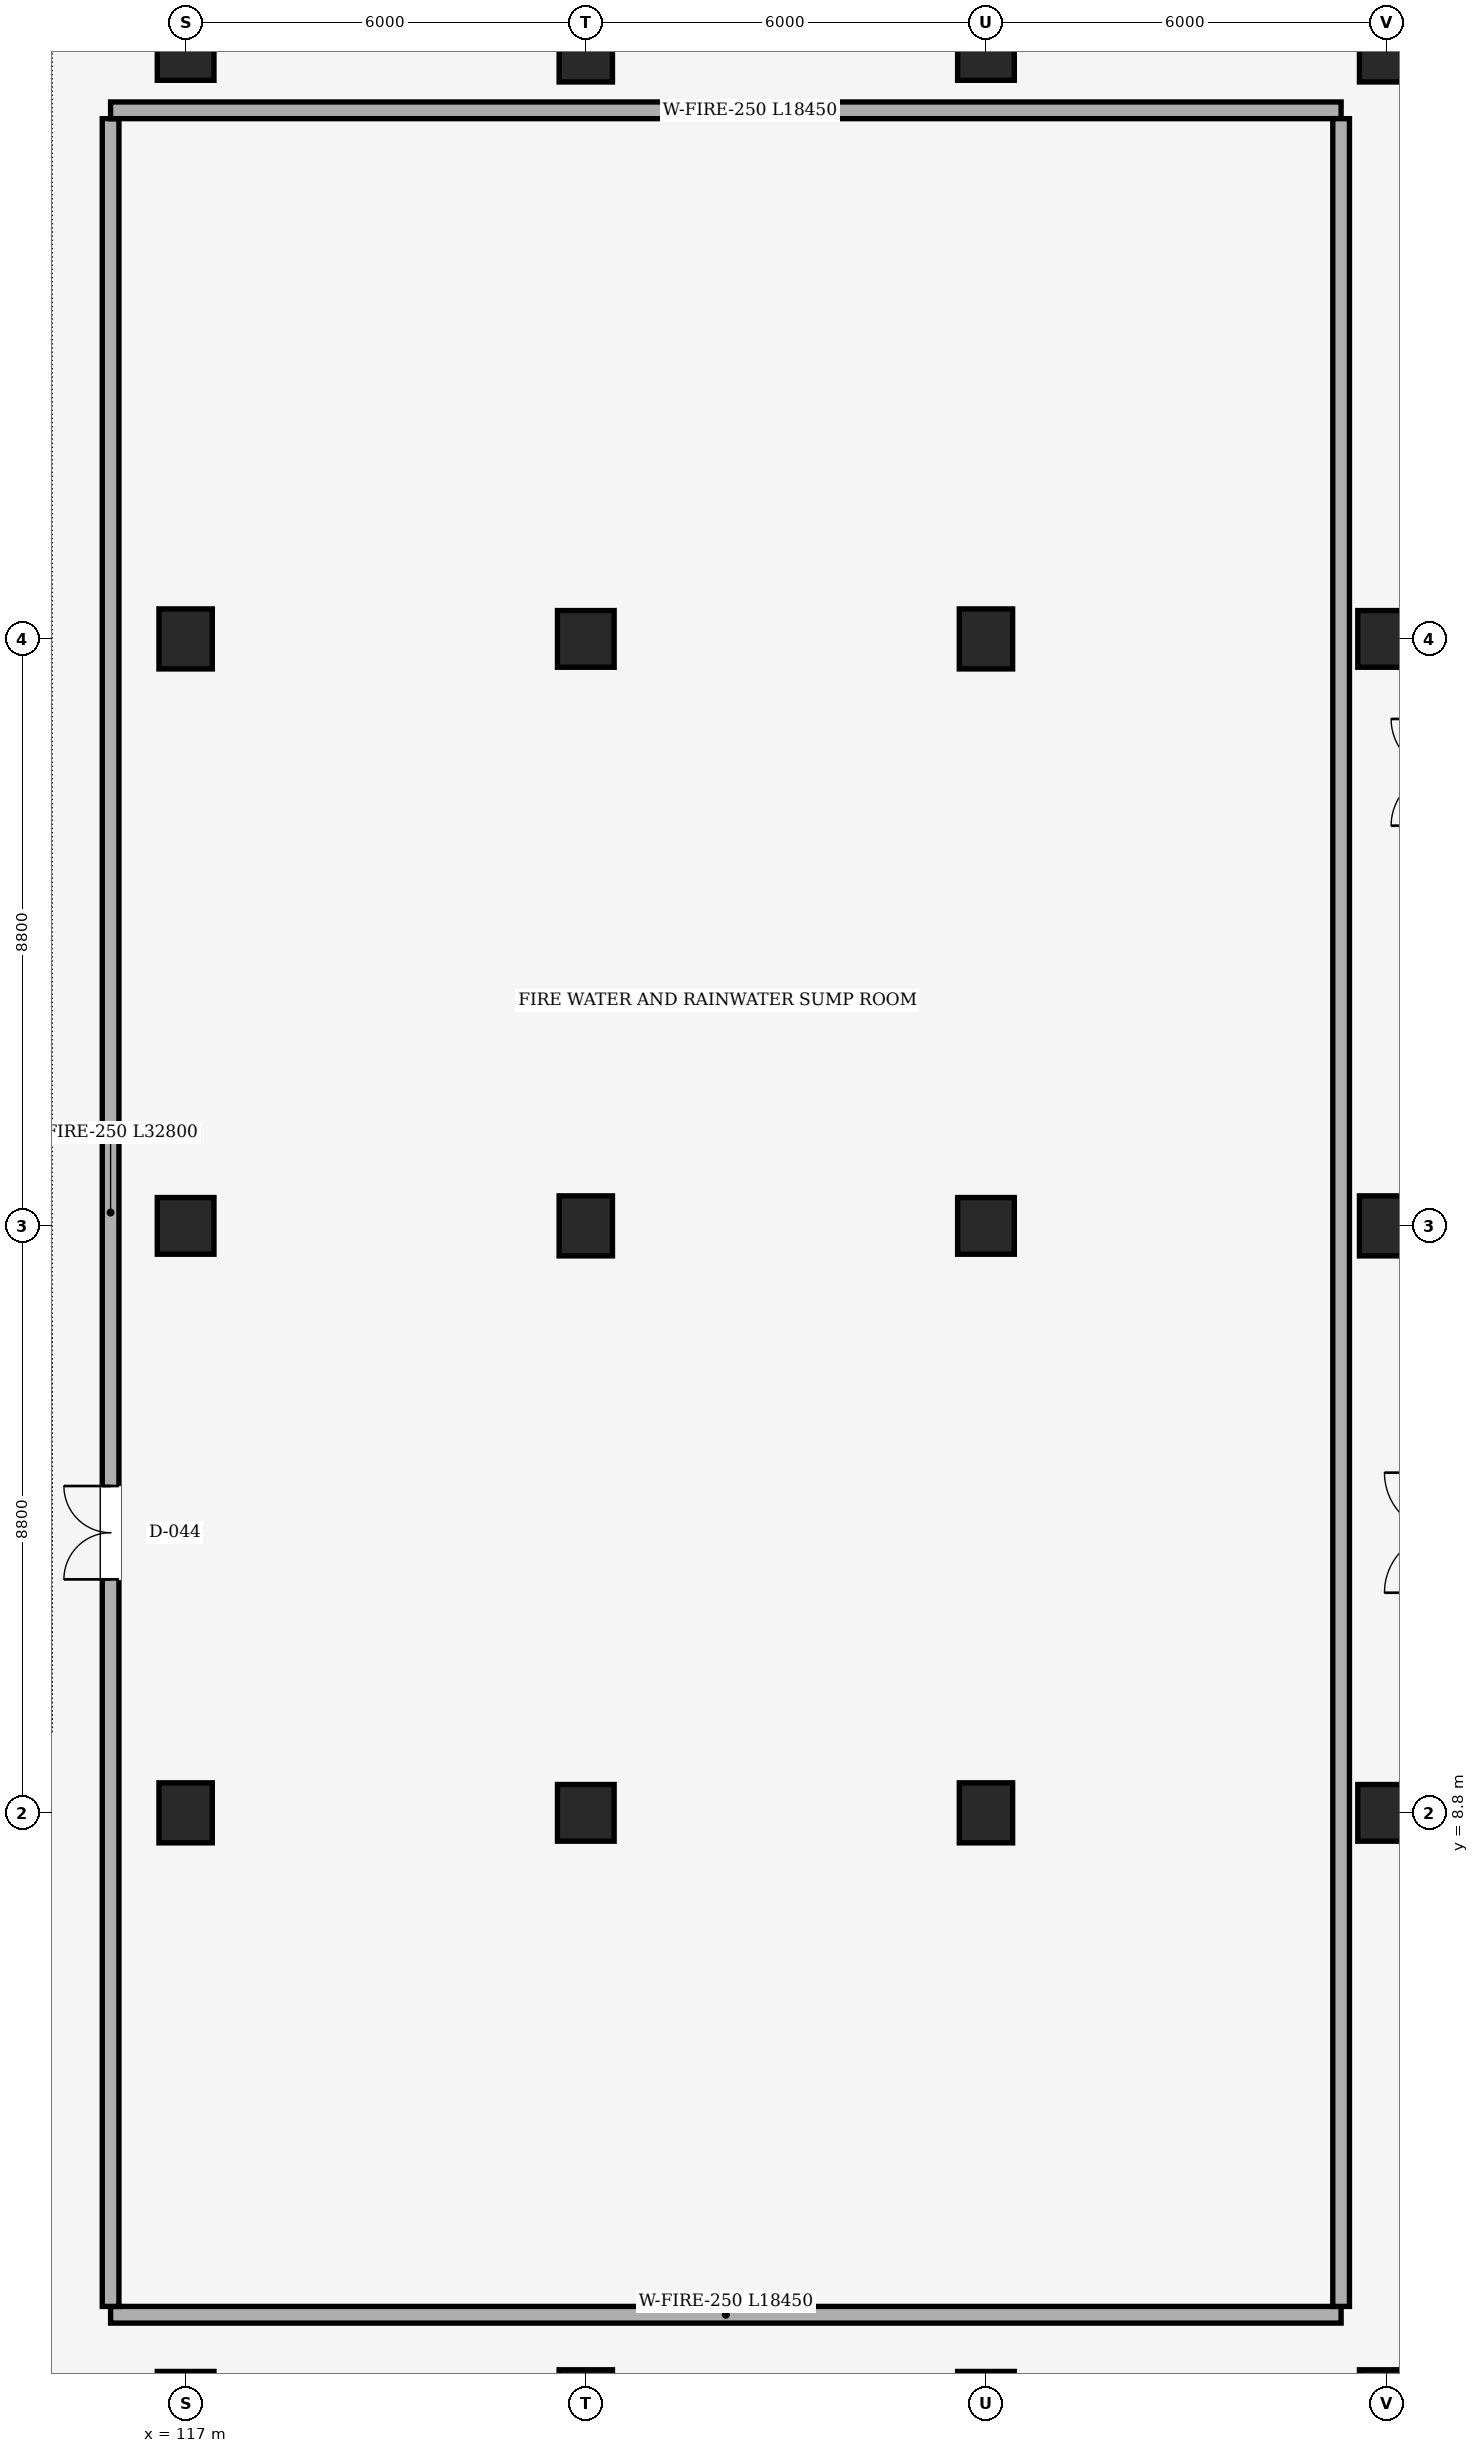
"""IFC4 building model, lengths in metres.
Left out: names, types, materials, properties, quantities, classifications, styles, units other than length and angle.
Written with IfcOpenShell. Run it as: python <this file> out.ifc"""

import sys

from ifc_helpers import new_model, si_unit, direction, frame, frame_2d, origin, origin_2d, place, context, subcontext, project, spatial, rectangle, extrude, element, fill, save


model = new_model("IFC4")
c1 = context("Model", 3, precision=1e-05, world=origin(), true_north=direction((0.0, 1.0)))
c2 = subcontext(c1, "Body", "Model", "MODEL_VIEW")
j1 = project(units=[si_unit("LENGTHUNIT", "METRE"), si_unit("PLANEANGLEUNIT", "RADIAN")], contexts=[c1])
p1 = place(None, origin())
s1 = spatial("IfcSite", under=j1, at=p1, CompositionType="ELEMENT")
p2 = place(p1, origin())
s2 = spatial("IfcBuilding", under=s1, at=p2, CompositionType="ELEMENT")
p3 = place(p2, frame((0.0, 0.0, -4.2)))
s3 = spatial("IfcBuildingStorey", under=s2, at=p3, CompositionType="ELEMENT", Elevation=-4.2)
p4 = place(p3, frame((117.0, 0.0, 0.0), z_axis=(0.0, 0.0, 1.0), x_axis=(1.0, 0.0, 0.0)))
e1 = element("IfcColumn", 1, at=p4, inside=s3, PredefinedType="COLUMN", context=c2, shape_type="SweptSolid", body=[
    extrude(rectangle(XDim=0.85, YDim=0.85, at=origin_2d()), origin(), (0.0, 0.0, 1.0), 3.92),
])
p5 = place(p3, frame((117.0, 8.8, 0.0), z_axis=(0.0, 0.0, 1.0), x_axis=(1.0, 0.0, 0.0)))
e2 = element("IfcColumn", 2, at=p5, inside=s3, PredefinedType="COLUMN", context=c2, shape_type="SweptSolid", body=[
    extrude(rectangle(XDim=0.8, YDim=0.9, at=origin_2d()), origin(), (0.0, 0.0, 1.0), 3.92),
])
p6 = place(p3, frame((117.0, 17.6, 0.0), z_axis=(0.0, 0.0, 1.0), x_axis=(1.0, 0.0, 0.0)))
e3 = element("IfcColumn", 3, at=p6, inside=s3, PredefinedType="COLUMN", context=c2, shape_type="SweptSolid", body=[
    extrude(rectangle(XDim=0.85, YDim=0.85, at=origin_2d()), origin(), (0.0, 0.0, 1.0), 3.92),
])
p7 = place(p3, frame((117.0, 26.4, 0.0), z_axis=(0.0, 0.0, 1.0), x_axis=(1.0, 0.0, 0.0)))
e4 = element("IfcColumn", 4, at=p7, inside=s3, PredefinedType="COLUMN", context=c2, shape_type="SweptSolid", body=[
    extrude(rectangle(XDim=0.8, YDim=0.9, at=origin_2d()), origin(), (0.0, 0.0, 1.0), 3.92),
])
p8 = place(p3, frame((117.0, 35.2, 0.0), z_axis=(0.0, 0.0, 1.0), x_axis=(1.0, 0.0, 0.0)))
e5 = element("IfcColumn", 5, at=p8, inside=s3, PredefinedType="COLUMN", context=c2, shape_type="SweptSolid", body=[
    extrude(rectangle(XDim=0.85, YDim=0.85, at=origin_2d()), origin(), (0.0, 0.0, 1.0), 3.92),
])
p9 = place(p3, frame((123.0, 0.0, 0.0), z_axis=(0.0, 0.0, 1.0), x_axis=(1.0, 0.0, 0.0)))
e6 = element("IfcColumn", 6, at=p9, inside=s3, PredefinedType="COLUMN", context=c2, shape_type="SweptSolid", body=[
    extrude(rectangle(XDim=0.8, YDim=0.9, at=origin_2d()), origin(), (0.0, 0.0, 1.0), 3.92),
])
p10 = place(p3, frame((123.0, 8.8, 0.0), z_axis=(0.0, 0.0, 1.0), x_axis=(1.0, 0.0, 0.0)))
e7 = element("IfcColumn", 7, at=p10, inside=s3, PredefinedType="COLUMN", context=c2, shape_type="SweptSolid", body=[
    extrude(rectangle(XDim=0.85, YDim=0.85, at=origin_2d()), origin(), (0.0, 0.0, 1.0), 3.92),
])
p11 = place(p3, frame((123.0, 17.6, 0.0), z_axis=(0.0, 0.0, 1.0), x_axis=(1.0, 0.0, 0.0)))
e8 = element("IfcColumn", 8, at=p11, inside=s3, PredefinedType="COLUMN", context=c2, shape_type="SweptSolid", body=[
    extrude(rectangle(XDim=0.8, YDim=0.9, at=origin_2d()), origin(), (0.0, 0.0, 1.0), 3.92),
])
p12 = place(p3, frame((123.0, 26.4, 0.0), z_axis=(0.0, 0.0, 1.0), x_axis=(1.0, 0.0, 0.0)))
e9 = element("IfcColumn", 9, at=p12, inside=s3, PredefinedType="COLUMN", context=c2, shape_type="SweptSolid", body=[
    extrude(rectangle(XDim=0.85, YDim=0.85, at=origin_2d()), origin(), (0.0, 0.0, 1.0), 3.92),
])
p13 = place(p3, frame((123.0, 35.2, 0.0), z_axis=(0.0, 0.0, 1.0), x_axis=(1.0, 0.0, 0.0)))
e10 = element("IfcColumn", 10, at=p13, inside=s3, PredefinedType="COLUMN", context=c2, shape_type="SweptSolid", body=[
    extrude(rectangle(XDim=0.8, YDim=0.9, at=origin_2d()), origin(), (0.0, 0.0, 1.0), 3.92),
])
p14 = place(p3, frame((129.0, 0.0, 0.0), z_axis=(0.0, 0.0, 1.0), x_axis=(1.0, 0.0, 0.0)))
e11 = element("IfcColumn", 11, at=p14, inside=s3, PredefinedType="COLUMN", context=c2, shape_type="SweptSolid", body=[
    extrude(rectangle(XDim=0.85, YDim=0.85, at=origin_2d()), origin(), (0.0, 0.0, 1.0), 3.92),
])
p15 = place(p3, frame((129.0, 8.8, 0.0), z_axis=(0.0, 0.0, 1.0), x_axis=(1.0, 0.0, 0.0)))
e12 = element("IfcColumn", 12, at=p15, inside=s3, PredefinedType="COLUMN", context=c2, shape_type="SweptSolid", body=[
    extrude(rectangle(XDim=0.8, YDim=0.9, at=origin_2d()), origin(), (0.0, 0.0, 1.0), 3.92),
])
p16 = place(p3, frame((129.0, 17.6, 0.0), z_axis=(0.0, 0.0, 1.0), x_axis=(1.0, 0.0, 0.0)))
e13 = element("IfcColumn", 13, at=p16, inside=s3, PredefinedType="COLUMN", context=c2, shape_type="SweptSolid", body=[
    extrude(rectangle(XDim=0.85, YDim=0.85, at=origin_2d()), origin(), (0.0, 0.0, 1.0), 3.92),
])
p17 = place(p3, frame((129.0, 26.4, 0.0), z_axis=(0.0, 0.0, 1.0), x_axis=(1.0, 0.0, 0.0)))
e14 = element("IfcColumn", 14, at=p17, inside=s3, PredefinedType="COLUMN", context=c2, shape_type="SweptSolid", body=[
    extrude(rectangle(XDim=0.8, YDim=0.9, at=origin_2d()), origin(), (0.0, 0.0, 1.0), 3.92),
])
p18 = place(p3, frame((129.0, 35.2, 0.0), z_axis=(0.0, 0.0, 1.0), x_axis=(1.0, 0.0, 0.0)))
e15 = element("IfcColumn", 15, at=p18, inside=s3, PredefinedType="COLUMN", context=c2, shape_type="SweptSolid", body=[
    extrude(rectangle(XDim=0.85, YDim=0.85, at=origin_2d()), origin(), (0.0, 0.0, 1.0), 3.92),
])
p19 = place(p3, frame((135.0, 0.0, 0.0), z_axis=(0.0, 0.0, 1.0), x_axis=(1.0, 0.0, 0.0)))
e16 = element("IfcColumn", 16, at=p19, inside=s3, PredefinedType="COLUMN", context=c2, shape_type="SweptSolid", body=[
    extrude(rectangle(XDim=0.8, YDim=0.9, at=origin_2d()), origin(), (0.0, 0.0, 1.0), 3.92),
])
p20 = place(p3, frame((135.0, 8.8, 0.0), z_axis=(0.0, 0.0, 1.0), x_axis=(1.0, 0.0, 0.0)))
e17 = element("IfcColumn", 17, at=p20, inside=s3, PredefinedType="COLUMN", context=c2, shape_type="SweptSolid", body=[
    extrude(rectangle(XDim=0.85, YDim=0.85, at=origin_2d()), origin(), (0.0, 0.0, 1.0), 3.92),
])
p21 = place(p3, frame((135.0, 17.6, 0.0), z_axis=(0.0, 0.0, 1.0), x_axis=(1.0, 0.0, 0.0)))
e18 = element("IfcColumn", 18, at=p21, inside=s3, PredefinedType="COLUMN", context=c2, shape_type="SweptSolid", body=[
    extrude(rectangle(XDim=0.8, YDim=0.9, at=origin_2d()), origin(), (0.0, 0.0, 1.0), 3.92),
])
p22 = place(p3, frame((135.0, 26.4, 0.0), z_axis=(0.0, 0.0, 1.0), x_axis=(1.0, 0.0, 0.0)))
e19 = element("IfcColumn", 19, at=p22, inside=s3, PredefinedType="COLUMN", context=c2, shape_type="SweptSolid", body=[
    extrude(rectangle(XDim=0.85, YDim=0.85, at=origin_2d()), origin(), (0.0, 0.0, 1.0), 3.92),
])
p23 = place(p3, frame((135.0, 35.2, 0.0), z_axis=(0.0, 0.0, 1.0), x_axis=(1.0, 0.0, 0.0)))
e20 = element("IfcColumn", 20, at=p23, inside=s3, PredefinedType="COLUMN", context=c2, shape_type="SweptSolid", body=[
    extrude(rectangle(XDim=0.8, YDim=0.9, at=origin_2d()), origin(), (0.0, 0.0, 1.0), 3.92),
])
p24 = place(p3, frame((134.325, 1.275, 0.0), z_axis=(0.0, 0.0, 1.0), x_axis=(-1.0, 0.0, 0.0)))
e21 = element("IfcWall", 21, at=p24, inside=s3, PredefinedType="SOLIDWALL", context=c2, shape_type="SweptSolid", body=[
    extrude(rectangle(XDim=18.45, YDim=0.25, at=frame_2d((9.225, 0.0))), origin(), (0.0, 0.0, 1.0), 3.9),
])
p25 = place(p3, frame((115.875, 1.4, 0.0), z_axis=(0.0, 0.0, 1.0), x_axis=(0.0, 1.0, 0.0)))
e22 = element("IfcWall", 22, at=p25, inside=s3, PredefinedType="SOLIDWALL", context=c2, shape_type="SweptSolid", body=[
    extrude(rectangle(XDim=32.8, YDim=0.25, at=frame_2d((16.4, 0.0))), origin(), (0.0, 0.0, 1.0), 3.9),
])
p26 = place(p25, frame((10.9, 0.0, 0.0)))
e23 = element("IfcOpeningElement", 23, at=p26, cuts=e22, PredefinedType="OPENING", context=c2, shape_type="SweptSolid", body=[
    extrude(rectangle(XDim=1.4, YDim=2.15, at=frame_2d((0.7, 1.075))), frame((0.0, 0.125, 0.0), z_axis=(0.0, -1.0, 0.0), x_axis=(1.0, 0.0, 0.0)), (0.0, 0.0, 1.0), 0.25),
])
p27 = place(p3, frame((115.875, 34.325, 0.0), z_axis=(0.0, 0.0, 1.0), x_axis=(1.0, 0.0, 0.0)))
e24 = element("IfcWall", 24, at=p27, inside=s3, PredefinedType="SOLIDWALL", context=c2, shape_type="SweptSolid", body=[
    extrude(rectangle(XDim=18.45, YDim=0.25, at=frame_2d((9.225, 0.0))), origin(), (0.0, 0.0, 1.0), 3.9),
])
p28 = place(p3, frame((134.325, 34.2, 0.0), z_axis=(0.0, 0.0, 1.0), x_axis=(0.0, -1.0, 0.0)))
e25 = element("IfcWall", 25, at=p28, inside=s3, PredefinedType="SOLIDWALL", context=c2, shape_type="SweptSolid", body=[
    extrude(rectangle(XDim=32.8, YDim=0.25, at=frame_2d((16.4, 0.0))), origin(), (0.0, 0.0, 1.0), 3.9),
])
p29 = place(p26, origin())
e26 = element("IfcDoor", 26, at=p29, inside=s3, OperationType="DOUBLE_DOOR_SINGLE_SWING", PredefinedType="DOOR", context=c2, shape_type="SweptSolid", body=[
    extrude(rectangle(XDim=1.4, YDim=2.15, at=frame_2d((0.7, 1.075))), frame((0.0, 0.025, 0.0), z_axis=(0.0, -1.0, 0.0), x_axis=(1.0, 0.0, 0.0)), (0.0, 0.0, 1.0), 0.05),
])
fill(e23, e26)
save(model, sys.argv[1])
